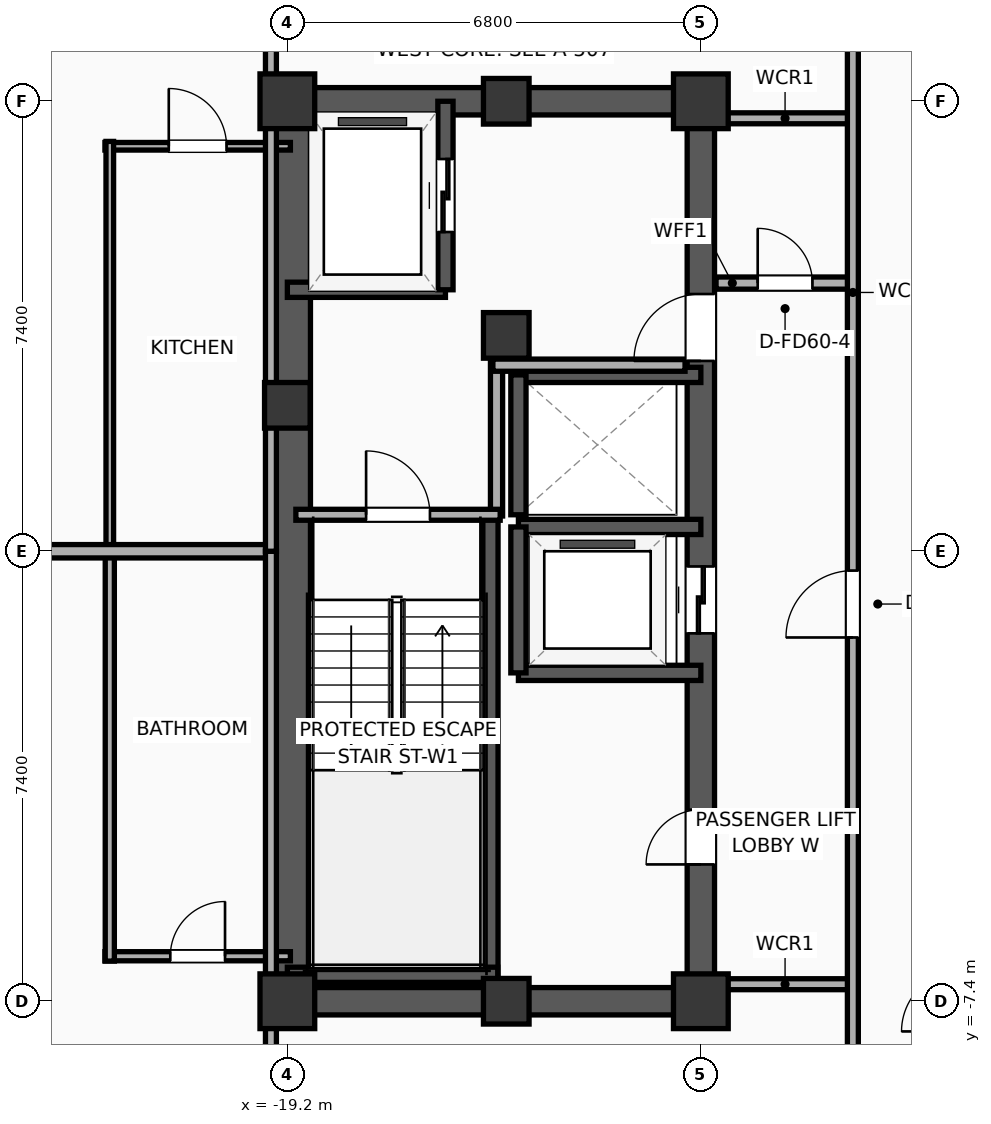
"""IFC4 building model, lengths in metres.
Left out: names, types, materials, properties, quantities, classifications, styles, units other than length and angle.
Written with IfcOpenShell. Run it as: python <this file> out.ifc"""

import sys

from ifc_helpers import new_model, si_unit, direction, frame, frame_2d, origin, origin_2d, place, context, subcontext, project, spatial, rectangle, extrude, element, fill, save


model = new_model("IFC4")
c1 = context("Model", 3, precision=1e-05, world=origin(), true_north=direction((0.0, 1.0)))
c2 = subcontext(c1, "Body", "Model", "MODEL_VIEW")
j1 = project(units=[si_unit("LENGTHUNIT", "METRE"), si_unit("PLANEANGLEUNIT", "RADIAN")], contexts=[c1])
p1 = place(None, origin())
s1 = spatial("IfcSite", under=j1, at=p1, CompositionType="ELEMENT")
p2 = place(p1, origin())
s2 = spatial("IfcBuilding", under=s1, at=p2, CompositionType="ELEMENT")
p3 = place(p2, frame((0.0, 0.0, 179.4)))
s3 = spatial("IfcBuildingStorey", under=s2, at=p3, CompositionType="ELEMENT", Elevation=179.4)
p4 = place(p3, frame((-19.2, -7.4, 0.0), z_axis=(0.0, 0.0, 1.0), x_axis=(1.0, 0.0, 0.0)))
e1 = element("IfcColumn", 1, at=p4, inside=s3, PredefinedType="COLUMN", context=c2, shape_type="SweptSolid", body=[
    extrude(rectangle(XDim=0.9, YDim=0.9, at=origin_2d()), origin(), (0.0, 0.0, 1.0), 3.9),
])
p5 = place(p3, frame((-19.2, 2.4, 0.0), z_axis=(0.0, 0.0, 1.0), x_axis=(1.0, 0.0, 0.0)))
e2 = element("IfcColumn", 2, at=p5, inside=s3, PredefinedType="COLUMN", context=c2, shape_type="SweptSolid", body=[
    extrude(rectangle(XDim=0.75, YDim=0.75, at=origin_2d()), origin(), (0.0, 0.0, 1.0), 3.9),
])
p6 = place(p3, frame((-19.2, 7.4, 0.0), z_axis=(0.0, 0.0, 1.0), x_axis=(1.0, 0.0, 0.0)))
e3 = element("IfcColumn", 3, at=p6, inside=s3, PredefinedType="COLUMN", context=c2, shape_type="SweptSolid", body=[
    extrude(rectangle(XDim=0.9, YDim=0.9, at=origin_2d()), origin(), (0.0, 0.0, 1.0), 3.9),
])
for number, where, z_axis, x_axis in (
    (4, (-15.6, -7.4, 0.0), (0.0, 0.0, 1.0), (1.0, 0.0, 0.0)),
    (5, (-15.6, 7.4, 0.0), (0.0, 0.0, 1.0), (1.0, 0.0, 0.0)),
):
    element("IfcColumn", number, at=place(p3, frame(where, z_axis=z_axis, x_axis=x_axis)), inside=s3, PredefinedType="COLUMN", context=c2, shape_type="SweptSolid", body=[
        extrude(rectangle(XDim=0.75, YDim=0.75, at=origin_2d()), origin(), (0.0, 0.0, 1.0), 3.9),
    ])
p7 = place(p3, frame((-12.4, -7.4, 0.0), z_axis=(0.0, 0.0, 1.0), x_axis=(1.0, 0.0, 0.0)))
e6 = element("IfcColumn", 6, at=p7, inside=s3, PredefinedType="COLUMN", context=c2, shape_type="SweptSolid", body=[
    extrude(rectangle(XDim=0.9, YDim=0.9, at=origin_2d()), origin(), (0.0, 0.0, 1.0), 3.9),
])
p8 = place(p3, frame((-15.6, 3.55, 0.0), z_axis=(0.0, 0.0, 1.0), x_axis=(1.0, 0.0, 0.0)))
e7 = element("IfcColumn", 7, at=p8, inside=s3, PredefinedType="COLUMN", context=c2, shape_type="SweptSolid", body=[
    extrude(rectangle(XDim=0.75, YDim=0.75, at=origin_2d()), origin(), (0.0, 0.0, 1.0), 3.9),
])
p9 = place(p3, frame((-12.4, 7.4, 0.0), z_axis=(0.0, 0.0, 1.0), x_axis=(1.0, 0.0, 0.0)))
e8 = element("IfcColumn", 8, at=p9, inside=s3, PredefinedType="COLUMN", context=c2, shape_type="SweptSolid", body=[
    extrude(rectangle(XDim=0.9, YDim=0.9, at=origin_2d()), origin(), (0.0, 0.0, 1.0), 3.9),
])
for number, where, z_axis, x_axis in (
    (9, (-19.425, -7.4, 0.0), (0.0, 0.0, 1.0), (1.0, 0.0, 0.0)),
    (10, (-19.425, 7.4, 0.0), (0.0, 0.0, 1.0), (1.0, 0.0, 0.0)),
):
    element("IfcWall", number, at=place(p3, frame(where, z_axis=z_axis, x_axis=x_axis)), inside=s3, PredefinedType="SHEAR", context=c2, shape_type="SweptSolid", body=[
        extrude(rectangle(XDim=7.25, YDim=0.45, at=frame_2d((3.625, 0.0))), origin(), (0.0, 0.0, 1.0), 3.65),
    ])
p10 = place(p3, frame((-19.145, -7.4, 0.0), z_axis=(0.0, 0.0, 1.0), x_axis=(0.0, 1.0, 0.0)))
e11 = element("IfcWall", 11, at=p10, inside=s3, PredefinedType="SHEAR", context=c2, shape_type="SweptSolid", body=[
    extrude(rectangle(XDim=14.8, YDim=0.65, at=frame_2d((7.4, 0.0))), origin(), (0.0, 0.0, 1.0), 3.65),
])
p11 = place(p3, frame((-12.4, -7.4, 0.0), z_axis=(0.0, 0.0, 1.0), x_axis=(0.0, 1.0, 0.0)))
e12 = element("IfcWall", 12, at=p11, inside=s3, PredefinedType="SHEAR", context=c2, shape_type="SweptSolid", body=[
    extrude(rectangle(XDim=14.8, YDim=0.45, at=frame_2d((7.4, 0.0))), origin(), (0.0, 0.0, 1.0), 3.65),
])
p12 = place(p11, frame((6.05, 0.0, 0.0)))
e13 = element("IfcOpeningElement", 13, at=p12, cuts=e12, PredefinedType="OPENING", context=c2, shape_type="SweptSolid", body=[
    extrude(rectangle(XDim=1.1, YDim=2.05, at=frame_2d((0.55, 1.025))), frame((0.0, 0.235, 0.0), z_axis=(0.0, -1.0, 0.0), x_axis=(1.0, 0.0, 0.0)), (0.0, 0.0, 1.0), 0.47),
])
p13 = place(p11, frame((10.53, 0.0, 0.0)))
e14 = element("IfcOpeningElement", 14, at=p13, cuts=e12, PredefinedType="OPENING", context=c2, shape_type="SweptSolid", body=[
    extrude(rectangle(XDim=1.1, YDim=2.05, at=frame_2d((0.55, 1.025))), frame((0.0, 0.235, 0.0), z_axis=(0.0, -1.0, 0.0), x_axis=(1.0, 0.0, 0.0)), (0.0, 0.0, 1.0), 0.47),
])
p14 = place(p11, frame((2.25, 0.0, 0.0)))
e15 = element("IfcOpeningElement", 15, at=p14, cuts=e12, PredefinedType="OPENING", context=c2, shape_type="SweptSolid", body=[
    extrude(rectangle(XDim=0.9, YDim=2.05, at=frame_2d((0.45, 1.025))), frame((0.0, 0.235, 0.0), z_axis=(0.0, -1.0, 0.0), x_axis=(1.0, 0.0, 0.0)), (0.0, 0.0, 1.0), 0.47),
])
p15 = place(p3, frame((-15.86, -7.085, 0.0), z_axis=(0.0, 0.0, 1.0), x_axis=(0.0, 1.0, 0.0)))
e16 = element("IfcWall", 16, at=p15, inside=s3, PredefinedType="SOLIDWALL", context=c2, shape_type="SweptSolid", body=[
    extrude(rectangle(XDim=7.685, YDim=0.25, at=frame_2d((3.843, 0.0))), origin(), (0.0, 0.0, 1.0), 3.65),
])
p16 = place(p3, frame((-19.2, -6.965, 0.0), z_axis=(0.0, 0.0, 1.0), x_axis=(1.0, 0.0, 0.0)))
e17 = element("IfcWall", 17, at=p16, inside=s3, PredefinedType="SOLIDWALL", context=c2, shape_type="SweptSolid", body=[
    extrude(rectangle(XDim=3.46, YDim=0.25, at=frame_2d((1.73, 0.0))), origin(), (0.0, 0.0, 1.0), 3.65),
])
p17 = place(p3, frame((-19.2, 4.3, 0.0), z_axis=(0.0, 0.0, 1.0), x_axis=(1.0, 0.0, 0.0)))
e18 = element("IfcWall", 18, at=p17, inside=s3, PredefinedType="SOLIDWALL", context=c2, shape_type="SweptSolid", body=[
    extrude(rectangle(XDim=2.6, YDim=0.25, at=frame_2d((1.3, 0.0))), origin(), (0.0, 0.0, 1.0), 3.65),
])
p18 = place(p3, frame((-16.6, 4.3, 0.0), z_axis=(0.0, 0.0, 1.0), x_axis=(0.0, 1.0, 0.0)))
e19 = element("IfcWall", 19, at=p18, inside=s3, PredefinedType="SOLIDWALL", context=c2, shape_type="SweptSolid", body=[
    extrude(rectangle(XDim=3.1, YDim=0.25, at=frame_2d((1.55, 0.0))), origin(), (0.0, 0.0, 1.0), 3.65),
])
p19 = place(p18, frame((0.95, 0.0, 0.0)))
e20 = element("IfcOpeningElement", 20, at=p19, cuts=e19, PredefinedType="OPENING", context=c2, shape_type="SweptSolid", body=[
    extrude(rectangle(XDim=1.2, YDim=2.05, at=frame_2d((0.6, 1.025))), frame((0.0, 0.135, 0.0), z_axis=(0.0, -1.0, 0.0), x_axis=(1.0, 0.0, 0.0)), (0.0, 0.0, 1.0), 0.27),
])
for number, where, z_axis, x_axis in (
    (21, (-15.4, -2.0, 0.0), (0.0, 0.0, 1.0), (1.0, 0.0, 0.0)),
    (22, (-12.4, 0.4, 0.0), (0.0, 0.0, 1.0), (-1.0, 0.0, 0.0)),
):
    element("IfcWall", number, at=place(p3, frame(where, z_axis=z_axis, x_axis=x_axis)), inside=s3, PredefinedType="SOLIDWALL", context=c2, shape_type="SweptSolid", body=[
        extrude(rectangle(XDim=3.0, YDim=0.25, at=frame_2d((1.5, 0.0))), origin(), (0.0, 0.0, 1.0), 3.65),
    ])
p20 = place(p3, frame((-15.4, 0.4, 0.0), z_axis=(0.0, 0.0, 1.0), x_axis=(0.0, -1.0, 0.0)))
e23 = element("IfcWall", 23, at=p20, inside=s3, PredefinedType="SOLIDWALL", context=c2, shape_type="SweptSolid", body=[
    extrude(rectangle(XDim=2.4, YDim=0.25, at=frame_2d((1.2, 0.0))), origin(), (0.0, 0.0, 1.0), 3.65),
])
p21 = place(p3, frame((-12.4, 2.9, 0.0), z_axis=(0.0, 0.0, 1.0), x_axis=(-1.0, 0.0, 0.0)))
e24 = element("IfcWall", 24, at=p21, inside=s3, PredefinedType="SOLIDWALL", context=c2, shape_type="SweptSolid", body=[
    extrude(rectangle(XDim=3.0, YDim=0.25, at=frame_2d((1.5, 0.0))), origin(), (0.0, 0.0, 1.0), 3.65),
])
p22 = place(p3, frame((-15.4, 2.9, 0.0), z_axis=(0.0, 0.0, 1.0), x_axis=(0.0, -1.0, 0.0)))
e25 = element("IfcWall", 25, at=p22, inside=s3, PredefinedType="SOLIDWALL", context=c2, shape_type="SweptSolid", body=[
    extrude(rectangle(XDim=2.3, YDim=0.25, at=frame_2d((1.15, 0.0))), origin(), (0.0, 0.0, 1.0), 3.65),
])
p23 = place(p3, frame((-15.76, 0.58, 0.0), z_axis=(0.0, 0.0, 1.0), x_axis=(0.0, 1.0, 0.0)))
e26 = element("IfcWall", 26, at=p23, inside=s3, PredefinedType="PARTITIONING", context=c2, shape_type="SweptSolid", body=[
    extrude(rectangle(XDim=2.52, YDim=0.2, at=frame_2d((1.26, 0.0))), origin(), (0.0, 0.0, 1.0), 3.65),
])
p24 = place(p3, frame((-15.82, 3.06, 0.0), z_axis=(0.0, 0.0, 1.0), x_axis=(1.0, 0.0, 0.0)))
e27 = element("IfcWall", 27, at=p24, inside=s3, PredefinedType="PARTITIONING", context=c2, shape_type="SweptSolid", body=[
    extrude(rectangle(XDim=3.16, YDim=0.2, at=frame_2d((1.58, 0.0))), origin(), (0.0, 0.0, 1.0), 3.65),
])
p25 = place(p3, frame((-19.06, 0.6, 0.0), z_axis=(0.0, 0.0, 1.0), x_axis=(1.0, 0.0, 0.0)))
e28 = element("IfcWall", 28, at=p25, inside=s3, PredefinedType="PARTITIONING", context=c2, shape_type="SweptSolid", body=[
    extrude(rectangle(XDim=3.36, YDim=0.18, at=frame_2d((1.68, 0.0))), origin(), (0.0, 0.0, 1.0), 3.65),
])
p26 = place(p25, frame((1.155, 0.0, 0.0)))
e29 = element("IfcOpeningElement", 29, at=p26, cuts=e28, PredefinedType="OPENING", context=c2, shape_type="SweptSolid", body=[
    extrude(rectangle(XDim=1.05, YDim=2.05, at=frame_2d((0.525, 1.025))), frame((0.0, 0.1, 0.0), z_axis=(0.0, -1.0, 0.0), x_axis=(1.0, 0.0, 0.0)), (0.0, 0.0, 1.0), 0.2),
])
p27 = place(p3, frame((-12.15, 4.41, 0.0), z_axis=(0.0, 0.0, 1.0), x_axis=(1.0, 0.0, 0.0)))
e30 = element("IfcWall", 30, at=p27, inside=s3, PredefinedType="PARTITIONING", context=c2, shape_type="SweptSolid", body=[
    extrude(rectangle(XDim=2.27, YDim=0.2, at=frame_2d((1.135, 0.0))), origin(), (0.0, 0.0, 1.0), 3.65),
])
p28 = place(p27, frame((0.685, 0.0, 0.0)))
e31 = element("IfcOpeningElement", 31, at=p28, cuts=e30, PredefinedType="OPENING", context=c2, shape_type="SweptSolid", body=[
    extrude(rectangle(XDim=0.9, YDim=2.05, at=frame_2d((0.45, 1.025))), frame((0.0, 0.11, 0.0), z_axis=(0.0, -1.0, 0.0), x_axis=(1.0, 0.0, 0.0)), (0.0, 0.0, 1.0), 0.22),
])
for number, where, z_axis, x_axis in (
    (32, (-12.15, 7.12, 0.0), (0.0, 0.0, 1.0), (1.0, 0.0, 0.0)),
    (33, (-12.15, -7.12, 0.0), (0.0, 0.0, 1.0), (1.0, 0.0, 0.0)),
):
    element("IfcWall", number, at=place(p3, frame(where, z_axis=z_axis, x_axis=x_axis)), inside=s3, PredefinedType="PARTITIONING", context=c2, shape_type="SweptSolid", body=[
        extrude(rectangle(XDim=2.27, YDim=0.18, at=frame_2d((1.135, 0.0))), origin(), (0.0, 0.0, 1.0), 3.65),
    ])
p29 = place(p3, frame((-9.9, -8.68, 0.0), z_axis=(0.0, 0.0, 1.0), x_axis=(0.0, 1.0, 0.0)))
e34 = element("IfcWall", 34, at=p29, inside=s3, PredefinedType="PARTITIONING", context=c2, shape_type="SweptSolid", body=[
    extrude(rectangle(XDim=17.36, YDim=0.18, at=frame_2d((8.68, 0.0))), origin(), (0.0, 0.0, 1.0), 3.65),
])
p30 = place(p29, frame((7.262, 0.0, 0.0)))
e35 = element("IfcOpeningElement", 35, at=p30, cuts=e34, PredefinedType="OPENING", context=c2, shape_type="SweptSolid", body=[
    extrude(rectangle(XDim=1.1, YDim=2.05, at=frame_2d((0.55, 1.025))), frame((0.0, 0.1, 0.0), z_axis=(0.0, -1.0, 0.0), x_axis=(1.0, 0.0, 0.0)), (0.0, 0.0, 1.0), 0.2),
])
p31 = place(p3, frame((-22.2, -6.66, 0.0), z_axis=(0.0, 0.0, 1.0), x_axis=(1.0, 0.0, 0.0)))
e36 = element("IfcWall", 36, at=p31, inside=s3, PredefinedType="PLUMBINGWALL", context=c2, shape_type="SweptSolid", body=[
    extrude(rectangle(XDim=3.05, YDim=0.15, at=frame_2d((1.525, 0.0))), origin(), (0.0, 0.0, 1.0), 3.65),
])
p32 = place(p31, frame((1.075, 0.0, 0.0)))
e37 = element("IfcOpeningElement", 37, at=p32, cuts=e36, PredefinedType="OPENING", context=c2, shape_type="SweptSolid", body=[
    extrude(rectangle(XDim=0.9, YDim=2.05, at=frame_2d((0.45, 1.025))), frame((0.0, 0.085, 0.0), z_axis=(0.0, -1.0, 0.0), x_axis=(1.0, 0.0, 0.0)), (0.0, 0.0, 1.0), 0.17),
])
p33 = place(p3, frame((-22.12, -6.74, 0.0), z_axis=(0.0, 0.0, 1.0), x_axis=(0.0, 1.0, 0.0)))
e38 = element("IfcWall", 38, at=p33, inside=s3, PredefinedType="PLUMBINGWALL", context=c2, shape_type="SweptSolid", body=[
    extrude(rectangle(XDim=6.72, YDim=0.15, at=frame_2d((3.36, 0.0))), origin(), (0.0, 0.0, 1.0), 3.65),
])
p34 = place(p3, frame((-22.2, 6.66, 0.0), z_axis=(0.0, 0.0, 1.0), x_axis=(1.0, 0.0, 0.0)))
e39 = element("IfcWall", 39, at=p34, inside=s3, PredefinedType="PARTITIONING", context=c2, shape_type="SweptSolid", body=[
    extrude(rectangle(XDim=3.05, YDim=0.125, at=frame_2d((1.525, 0.0))), origin(), (0.0, 0.0, 1.0), 3.04),
])
p35 = place(p34, frame((1.05, 0.0, 0.0)))
e40 = element("IfcOpeningElement", 40, at=p35, cuts=e39, PredefinedType="OPENING", context=c2, shape_type="SweptSolid", body=[
    extrude(rectangle(XDim=0.95, YDim=2.05, at=frame_2d((0.475, 1.025))), frame((0.0, 0.073, 0.0), z_axis=(0.0, -1.0, 0.0), x_axis=(1.0, 0.0, 0.0)), (0.0, 0.0, 1.0), 0.145),
])
p36 = place(p3, frame((-22.12, 0.02, 0.0), z_axis=(0.0, 0.0, 1.0), x_axis=(0.0, 1.0, 0.0)))
e41 = element("IfcWall", 41, at=p36, inside=s3, PredefinedType="PARTITIONING", context=c2, shape_type="SweptSolid", body=[
    extrude(rectangle(XDim=6.72, YDim=0.125, at=frame_2d((3.36, 0.0))), origin(), (0.0, 0.0, 1.0), 3.65),
])
p37 = place(p3, frame((-19.47, 0.0, 0.0), z_axis=(0.0, 0.0, 1.0), x_axis=(-1.0, 0.0, 0.0)))
e42 = element("IfcWall", 42, at=p37, inside=s3, PredefinedType="PARTITIONING", context=c2, shape_type="SweptSolid", body=[
    extrude(rectangle(XDim=13.586, YDim=0.22, at=frame_2d((6.793, 0.0))), origin(), (0.0, 0.0, 1.0), 3.65),
])
p38 = place(p3, frame((-19.47, -22.652, 0.0), z_axis=(0.0, 0.0, 1.0), x_axis=(0.0, 1.0, 0.0)))
e43 = element("IfcWall", 43, at=p38, inside=s3, PredefinedType="PARTITIONING", context=c2, shape_type="SweptSolid", body=[
    extrude(rectangle(XDim=22.652, YDim=0.18, at=frame_2d((11.326, 0.0))), origin(), (0.0, 0.0, 1.0), 3.65),
])
p39 = place(p38, frame((12.871, 0.0, 0.0)))
e44 = element("IfcOpeningElement", 44, at=p39, cuts=e43, PredefinedType="OPENING", context=c2, shape_type="SweptSolid", body=[
    extrude(rectangle(XDim=0.9, YDim=2.05, at=frame_2d((0.45, 1.025))), frame((0.0, 0.1, 0.0), z_axis=(0.0, -1.0, 0.0), x_axis=(1.0, 0.0, 0.0)), (0.0, 0.0, 1.0), 0.2),
])
p40 = place(p3, frame((-19.47, 0.0, 0.0), z_axis=(0.0, 0.0, 1.0), x_axis=(0.0, 1.0, 0.0)))
e45 = element("IfcWall", 45, at=p40, inside=s3, PredefinedType="PARTITIONING", context=c2, shape_type="SweptSolid", body=[
    extrude(rectangle(XDim=18.031, YDim=0.18, at=frame_2d((9.016, 0.0))), origin(), (0.0, 0.0, 1.0), 3.04),
])
p41 = place(p40, frame((8.879, 0.0, 0.0)))
e46 = element("IfcOpeningElement", 46, at=p41, cuts=e45, PredefinedType="OPENING", context=c2, shape_type="SweptSolid", body=[
    extrude(rectangle(XDim=0.9, YDim=2.05, at=frame_2d((0.45, 1.025))), frame((0.0, 0.1, 0.0), z_axis=(0.0, -1.0, 0.0), x_axis=(1.0, 0.0, 0.0)), (0.0, 0.0, 1.0), 0.2),
])
p42 = place(p19, origin())
e47 = element("IfcDoor", 47, at=p42, inside=s3, OperationType="SLIDING_TO_LEFT", PredefinedType="DOOR", context=c2, shape_type="SweptSolid", body=[
    extrude(rectangle(XDim=1.2, YDim=2.05, at=frame_2d((0.6, 1.025))), frame((0.0, 0.025, 0.0), z_axis=(0.0, -1.0, 0.0), x_axis=(1.0, 0.0, 0.0)), (0.0, 0.0, 1.0), 0.05),
])
fill(e20, e47)
p43 = place(p12, origin())
e48 = element("IfcDoor", 48, at=p43, inside=s3, OperationType="SLIDING_TO_LEFT", PredefinedType="DOOR", context=c2, shape_type="SweptSolid", body=[
    extrude(rectangle(XDim=1.1, YDim=2.05, at=frame_2d((0.55, 1.025))), frame((0.0, 0.025, 0.0), z_axis=(0.0, -1.0, 0.0), x_axis=(1.0, 0.0, 0.0)), (0.0, 0.0, 1.0), 0.05),
])
fill(e13, e48)
p44 = place(p26, origin())
e49 = element("IfcDoor", 49, at=p44, inside=s3, OperationType="SINGLE_SWING_LEFT", PredefinedType="DOOR", context=c2, shape_type="SweptSolid", body=[
    extrude(rectangle(XDim=1.05, YDim=2.05, at=frame_2d((0.525, 1.025))), frame((0.0, 0.025, 0.0), z_axis=(0.0, -1.0, 0.0), x_axis=(1.0, 0.0, 0.0)), (0.0, 0.0, 1.0), 0.05),
])
fill(e29, e49)
p45 = place(p28, origin())
e50 = element("IfcDoor", 50, at=p45, inside=s3, OperationType="SINGLE_SWING_LEFT", PredefinedType="DOOR", context=c2, shape_type="SweptSolid", body=[
    extrude(rectangle(XDim=0.9, YDim=2.05, at=frame_2d((0.45, 1.025))), frame((0.0, 0.025, 0.0), z_axis=(0.0, -1.0, 0.0), x_axis=(1.0, 0.0, 0.0)), (0.0, 0.0, 1.0), 0.05),
])
fill(e31, e50)
p46 = place(p30, origin())
e51 = element("IfcDoor", 51, at=p46, inside=s3, OperationType="SINGLE_SWING_LEFT", PredefinedType="DOOR", context=c2, shape_type="SweptSolid", body=[
    extrude(rectangle(XDim=1.1, YDim=2.05, at=frame_2d((0.55, 1.025))), frame((0.0, 0.025, 0.0), z_axis=(0.0, -1.0, 0.0), x_axis=(1.0, 0.0, 0.0)), (0.0, 0.0, 1.0), 0.05),
])
fill(e35, e51)
p47 = place(p32, origin())
e52 = element("IfcDoor", 52, at=p47, inside=s3, OperationType="SINGLE_SWING_RIGHT", PredefinedType="DOOR", context=c2, shape_type="SweptSolid", body=[
    extrude(rectangle(XDim=0.9, YDim=2.05, at=frame_2d((0.45, 1.025))), frame((0.0, 0.025, 0.0), z_axis=(0.0, -1.0, 0.0), x_axis=(1.0, 0.0, 0.0)), (0.0, 0.0, 1.0), 0.05),
])
fill(e37, e52)
p48 = place(p35, origin())
e53 = element("IfcDoor", 53, at=p48, inside=s3, OperationType="SINGLE_SWING_LEFT", PredefinedType="DOOR", context=c2, shape_type="SweptSolid", body=[
    extrude(rectangle(XDim=0.95, YDim=2.05, at=frame_2d((0.475, 1.025))), frame((0.0, 0.025, 0.0), z_axis=(0.0, -1.0, 0.0), x_axis=(1.0, 0.0, 0.0)), (0.0, 0.0, 1.0), 0.05),
])
fill(e40, e53)
p49 = place(p13, origin())
e54 = element("IfcDoor", 54, at=p49, inside=s3, OperationType="SINGLE_SWING_LEFT", PredefinedType="DOOR", context=c2, shape_type="SweptSolid", body=[
    extrude(rectangle(XDim=1.1, YDim=2.05, at=frame_2d((0.55, 1.025))), frame((0.0, 0.025, 0.0), z_axis=(0.0, -1.0, 0.0), x_axis=(1.0, 0.0, 0.0)), (0.0, 0.0, 1.0), 0.05),
])
fill(e14, e54)
p50 = place(p14, origin())
e55 = element("IfcDoor", 55, at=p50, inside=s3, OperationType="SINGLE_SWING_LEFT", PredefinedType="DOOR", context=c2, shape_type="SweptSolid", body=[
    extrude(rectangle(XDim=0.9, YDim=2.05, at=frame_2d((0.45, 1.025))), frame((0.0, 0.025, 0.0), z_axis=(0.0, -1.0, 0.0), x_axis=(1.0, 0.0, 0.0)), (0.0, 0.0, 1.0), 0.05),
])
fill(e15, e55)
save(model, sys.argv[1])
